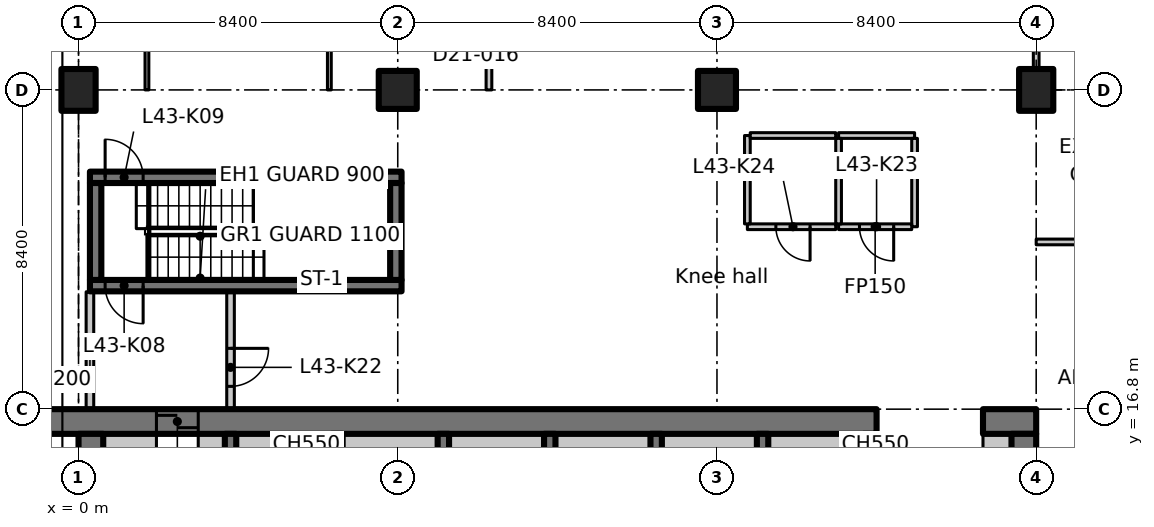
"""IFC4 building model, lengths in metres.
Left out: names, types, materials, properties, quantities, classifications, styles, units other than length and angle.
Written with IfcOpenShell. Run it as: python <this file> out.ifc"""

import sys

from ifc_helpers import new_model, si_unit, direction, frame, frame_2d, origin, origin_2d, place, context, subcontext, project, spatial, polyline, rectangle, outline, extrude, element, fill, save


model = new_model("IFC4")
c1 = context("Model", 3, precision=1e-05, world=origin(), true_north=direction((0.0, 1.0)))
c2 = subcontext(c1, "Body", "Model", "MODEL_VIEW")
j1 = project(units=[si_unit("LENGTHUNIT", "METRE"), si_unit("PLANEANGLEUNIT", "RADIAN")], contexts=[c1])
p1 = place(None, origin())
s1 = spatial("IfcSite", under=j1, at=p1, CompositionType="ELEMENT")
p2 = place(p1, origin())
s2 = spatial("IfcBuilding", under=s1, at=p2, CompositionType="ELEMENT")
p3 = place(p2, frame((0.0, 0.0, 174.0)))
s3 = spatial("IfcBuildingStorey", under=s2, at=p3, CompositionType="ELEMENT", Elevation=174.0)
p4 = place(p3, frame((0.0, 25.2, 0.0), z_axis=(0.0, 0.0, 1.0), x_axis=(1.0, 0.0, 0.0)))
e1 = element("IfcColumn", 1, at=p4, inside=s3, PredefinedType="COLUMN", context=c2, shape_type="SweptSolid", body=[
    extrude(rectangle(XDim=0.9, YDim=1.1, at=origin_2d()), origin(), (0.0, 0.0, 1.0), 3.35),
])
for number, where, z_axis, x_axis in (
    (2, (8.4, 25.2, 0.0), (0.0, 0.0, 1.0), (1.0, 0.0, 0.0)),
    (3, (16.8, 25.2, 0.0), (0.0, 0.0, 1.0), (1.0, 0.0, 0.0)),
):
    element("IfcColumn", number, at=place(p3, frame(where, z_axis=z_axis, x_axis=x_axis)), inside=s3, PredefinedType="COLUMN", context=c2, shape_type="SweptSolid", body=[
        extrude(rectangle(XDim=1.0, YDim=1.0, at=origin_2d()), origin(), (0.0, 0.0, 1.0), 3.35),
    ])
p5 = place(p3, frame((25.2, 25.2, 0.0), z_axis=(0.0, 0.0, 1.0), x_axis=(1.0, 0.0, 0.0)))
e4 = element("IfcColumn", 4, at=p5, inside=s3, PredefinedType="COLUMN", context=c2, shape_type="SweptSolid", body=[
    extrude(rectangle(XDim=0.9, YDim=1.1, at=origin_2d()), origin(), (0.0, 0.0, 1.0), 3.35),
])
p6 = place(p3, frame((-1.1, 16.475, 0.0), z_axis=(0.0, 0.0, 1.0), x_axis=(1.0, 0.0, 0.0)))
e5 = element("IfcWall", 5, at=p6, inside=s3, PredefinedType="SHEAR", context=c2, shape_type="SweptSolid", body=[
    extrude(rectangle(XDim=22.1, YDim=0.65, at=frame_2d((11.05, 0.0))), origin(), (0.0, 0.0, 1.0), 3.35),
])
p7 = place(p6, frame((3.15, 0.0, 0.0)))
e6 = element("IfcOpeningElement", 6, at=p7, cuts=e5, PredefinedType="OPENING", context=c2, shape_type="SweptSolid", body=[
    extrude(rectangle(XDim=1.1, YDim=2.3, at=frame_2d((0.55, 1.15))), frame((0.0, 0.335, 0.0), z_axis=(0.0, -1.0, 0.0), x_axis=(1.0, 0.0, 0.0)), (0.0, 0.0, 1.0), 0.67),
])
p8 = place(p3, frame((23.8, 16.475, 0.0), z_axis=(0.0, 0.0, 1.0), x_axis=(1.0, 0.0, 0.0)))
e7 = element("IfcWall", 7, at=p8, inside=s3, PredefinedType="SHEAR", context=c2, shape_type="SweptSolid", body=[
    extrude(rectangle(XDim=1.4, YDim=0.65, at=frame_2d((0.7, 0.0))), origin(), (0.0, 0.0, 1.0), 3.35),
])
p9 = place(p3, frame((0.325, 7.286, 0.0), z_axis=(0.0, 0.0, 1.0), x_axis=(0.0, 1.0, 0.0)))
e8 = element("IfcWall", 8, at=p9, inside=s3, PredefinedType="SHEAR", context=c2, shape_type="SweptSolid", body=[
    extrude(rectangle(XDim=8.864, YDim=0.65, at=frame_2d((4.432, 0.0))), origin(), (0.0, 0.0, 1.0), 3.35),
])
p10 = place(p3, frame((24.875, 12.6, 0.0), z_axis=(0.0, 0.0, 1.0), x_axis=(0.0, 1.0, 0.0)))
e9 = element("IfcWall", 9, at=p10, inside=s3, PredefinedType="SHEAR", context=c2, shape_type="SweptSolid", body=[
    extrude(rectangle(XDim=3.55, YDim=0.65, at=frame_2d((1.775, 0.0))), origin(), (0.0, 0.0, 1.0), 3.35),
])
p11 = place(p3, frame((0.65, 15.875, 0.0), z_axis=(0.0, 0.0, 1.0), x_axis=(1.0, 0.0, 0.0)))
e10 = element("IfcWall", 10, at=p11, inside=s3, PredefinedType="PARTITIONING", context=c2, shape_type="SweptSolid", body=[
    extrude(rectangle(XDim=1.4, YDim=0.55, at=frame_2d((0.7, 0.0))), origin(), (0.0, 0.0, 1.0), 3.35),
])
p12 = place(p3, frame((23.8, 15.875, 0.0), z_axis=(0.0, 0.0, 1.0), x_axis=(1.0, 0.0, 0.0)))
e11 = element("IfcWall", 11, at=p12, inside=s3, PredefinedType="PARTITIONING", context=c2, shape_type="SweptSolid", body=[
    extrude(rectangle(XDim=0.75, YDim=0.55, at=frame_2d((0.375, 0.0))), origin(), (0.0, 0.0, 1.0), 3.35),
])
for number, where, z_axis, x_axis in (
    (12, (4.0, 12.95, 0.0), (0.0, 0.0, 1.0), (0.0, 1.0, 0.0)),
    (13, (6.8, 12.95, 0.0), (0.0, 0.0, 1.0), (0.0, 1.0, 0.0)),
    (14, (9.6, 12.95, 0.0), (0.0, 0.0, 1.0), (0.0, 1.0, 0.0)),
    (15, (12.4, 12.95, 0.0), (0.0, 0.0, 1.0), (0.0, 1.0, 0.0)),
    (16, (15.2, 12.95, 0.0), (0.0, 0.0, 1.0), (0.0, 1.0, 0.0)),
    (17, (18.0, 12.95, 0.0), (0.0, 0.0, 1.0), (0.0, 1.0, 0.0)),
    (18, (20.8, 12.95, 0.0), (0.0, 0.0, 1.0), (0.0, 1.0, 0.0)),
):
    element("IfcWall", number, at=place(p3, frame(where, z_axis=z_axis, x_axis=x_axis)), inside=s3, PredefinedType="SHEAR", context=c2, shape_type="SweptSolid", body=[
        extrude(rectangle(XDim=3.2, YDim=0.3, at=frame_2d((1.6, 0.0))), origin(), (0.0, 0.0, 1.0), 3.35),
    ])
p13 = place(p3, frame((8.5, 20.05, 0.0), z_axis=(0.0, 0.0, 1.0), x_axis=(-1.0, 0.0, 0.0)))
e19 = element("IfcWall", 19, at=p13, inside=s3, PredefinedType="SHEAR", context=c2, shape_type="SweptSolid", body=[
    extrude(rectangle(XDim=8.2, YDim=0.3, at=frame_2d((4.1, 0.0))), origin(), (0.0, 0.0, 1.0), 3.35),
])
p14 = place(p13, frame((6.8, 0.0, 0.0)))
e20 = element("IfcOpeningElement", 20, at=p14, cuts=e19, PredefinedType="OPENING", context=c2, shape_type="SweptSolid", body=[
    extrude(rectangle(XDim=1.0, YDim=2.1, at=frame_2d((0.5, 1.05))), frame((0.0, 0.16, 0.0), z_axis=(0.0, -1.0, 0.0), x_axis=(1.0, 0.0, 0.0)), (0.0, 0.0, 1.0), 0.32),
])
p15 = place(p3, frame((0.3, 22.9, 0.0), z_axis=(0.0, 0.0, 1.0), x_axis=(1.0, 0.0, 0.0)))
e21 = element("IfcWall", 21, at=p15, inside=s3, PredefinedType="SHEAR", context=c2, shape_type="SweptSolid", body=[
    extrude(rectangle(XDim=8.2, YDim=0.3, at=frame_2d((4.1, 0.0))), origin(), (0.0, 0.0, 1.0), 3.35),
])
p16 = place(p15, frame((0.4, 0.0, 0.0)))
e22 = element("IfcOpeningElement", 22, at=p16, cuts=e21, PredefinedType="OPENING", context=c2, shape_type="SweptSolid", body=[
    extrude(rectangle(XDim=1.0, YDim=2.1, at=frame_2d((0.5, 1.05))), frame((0.0, 0.16, 0.0), z_axis=(0.0, -1.0, 0.0), x_axis=(1.0, 0.0, 0.0)), (0.0, 0.0, 1.0), 0.32),
])
for number, where, z_axis, x_axis in (
    (23, (0.45, 20.2, 0.0), (0.0, 0.0, 1.0), (0.0, 1.0, 0.0)),
    (24, (8.35, 20.2, 0.0), (0.0, 0.0, 1.0), (0.0, 1.0, 0.0)),
):
    element("IfcWall", number, at=place(p3, frame(where, z_axis=z_axis, x_axis=x_axis)), inside=s3, PredefinedType="SHEAR", context=c2, shape_type="SweptSolid", body=[
        extrude(rectangle(XDim=2.55, YDim=0.3, at=frame_2d((1.275, 0.0))), origin(), (0.0, 0.0, 1.0), 3.35),
    ])
p17 = place(p3, frame((0.3, 16.812, 0.0), z_axis=(0.0, 0.0, 1.0), x_axis=(0.0, 1.0, 0.0)))
e25 = element("IfcWall", 25, at=p17, inside=s3, PredefinedType="PARTITIONING", context=c2, shape_type="SweptSolid", body=[
    extrude(rectangle(XDim=3.076, YDim=0.2, at=frame_2d((1.538, 0.0))), origin(), (0.0, 0.0, 1.0), 2.98),
])
p18 = place(p3, frame((4.0, 19.888, 0.0), z_axis=(0.0, 0.0, 1.0), x_axis=(0.0, -1.0, 0.0)))
e26 = element("IfcWall", 26, at=p18, inside=s3, PredefinedType="PARTITIONING", context=c2, shape_type="SweptSolid", body=[
    extrude(rectangle(XDim=3.076, YDim=0.2, at=frame_2d((1.538, 0.0))), origin(), (0.0, 0.0, 1.0), 3.35),
])
p19 = place(p18, frame((1.488, 0.0, 0.0)))
e27 = element("IfcOpeningElement", 27, at=p19, cuts=e26, PredefinedType="OPENING", context=c2, shape_type="SweptSolid", body=[
    extrude(rectangle(XDim=1.0, YDim=2.1, at=frame_2d((0.5, 1.05))), frame((0.0, 0.11, 0.0), z_axis=(0.0, -1.0, 0.0), x_axis=(1.0, 0.0, 0.0)), (0.0, 0.0, 1.0), 0.22),
])
p20 = place(p3, frame((20.0, 24.0, 0.0), z_axis=(0.0, 0.0, 1.0), x_axis=(1.0, 0.0, 0.0)))
e28 = element("IfcWall", 28, at=p20, inside=s3, PredefinedType="PARTITIONING", context=c2, shape_type="SweptSolid", body=[
    extrude(rectangle(XDim=2.0, YDim=0.15, at=frame_2d((1.0, 0.0))), origin(), (0.0, 0.0, 1.0), 3.35),
])
p21 = place(p3, frame((22.0, 23.925, 0.0), z_axis=(0.0, 0.0, 1.0), x_axis=(0.0, -1.0, 0.0)))
e29 = element("IfcWall", 29, at=p21, inside=s3, PredefinedType="PARTITIONING", context=c2, shape_type="SweptSolid", body=[
    extrude(rectangle(XDim=2.325, YDim=0.15, at=frame_2d((1.163, 0.0))), origin(), (0.0, 0.0, 1.0), 3.35),
])
p22 = place(p3, frame((21.925, 21.6, 0.0), z_axis=(0.0, 0.0, 1.0), x_axis=(-1.0, 0.0, 0.0)))
e30 = element("IfcWall", 30, at=p22, inside=s3, PredefinedType="PARTITIONING", context=c2, shape_type="SweptSolid", body=[
    extrude(rectangle(XDim=1.925, YDim=0.15, at=frame_2d((0.962, 0.0))), origin(), (0.0, 0.0, 1.0), 3.35),
])
p23 = place(p22, frame((0.475, 0.0, 0.0)))
e31 = element("IfcOpeningElement", 31, at=p23, cuts=e30, PredefinedType="OPENING", context=c2, shape_type="SweptSolid", body=[
    extrude(rectangle(XDim=0.9, YDim=2.1, at=frame_2d((0.45, 1.05))), frame((0.0, 0.085, 0.0), z_axis=(0.0, -1.0, 0.0), x_axis=(1.0, 0.0, 0.0)), (0.0, 0.0, 1.0), 0.17),
])
p24 = place(p3, frame((20.0, 21.675, 0.0), z_axis=(0.0, 0.0, 1.0), x_axis=(0.0, 1.0, 0.0)))
e32 = element("IfcWall", 32, at=p24, inside=s3, PredefinedType="PARTITIONING", context=c2, shape_type="SweptSolid", body=[
    extrude(rectangle(XDim=2.25, YDim=0.15, at=frame_2d((1.125, 0.0))), origin(), (0.0, 0.0, 1.0), 3.35),
])
p25 = place(p3, frame((19.925, 21.6, 0.0), z_axis=(0.0, 0.0, 1.0), x_axis=(-1.0, 0.0, 0.0)))
e33 = element("IfcWall", 33, at=p25, inside=s3, PredefinedType="PARTITIONING", context=c2, shape_type="SweptSolid", body=[
    extrude(rectangle(XDim=2.325, YDim=0.15, at=frame_2d((1.163, 0.0))), origin(), (0.0, 0.0, 1.0), 3.35),
])
p26 = place(p25, frame((0.675, 0.0, 0.0)))
e34 = element("IfcOpeningElement", 34, at=p26, cuts=e33, PredefinedType="OPENING", context=c2, shape_type="SweptSolid", body=[
    extrude(rectangle(XDim=0.9, YDim=2.1, at=frame_2d((0.45, 1.05))), frame((0.0, 0.085, 0.0), z_axis=(0.0, -1.0, 0.0), x_axis=(1.0, 0.0, 0.0)), (0.0, 0.0, 1.0), 0.17),
])
p27 = place(p3, frame((17.6, 21.675, 0.0), z_axis=(0.0, 0.0, 1.0), x_axis=(0.0, 1.0, 0.0)))
e35 = element("IfcWall", 35, at=p27, inside=s3, PredefinedType="PARTITIONING", context=c2, shape_type="SweptSolid", body=[
    extrude(rectangle(XDim=2.325, YDim=0.15, at=frame_2d((1.163, 0.0))), origin(), (0.0, 0.0, 1.0), 3.35),
])
p28 = place(p3, frame((17.675, 24.0, 0.0), z_axis=(0.0, 0.0, 1.0), x_axis=(1.0, 0.0, 0.0)))
e36 = element("IfcWall", 36, at=p28, inside=s3, PredefinedType="PARTITIONING", context=c2, shape_type="SweptSolid", body=[
    extrude(rectangle(XDim=2.25, YDim=0.15, at=frame_2d((1.125, 0.0))), origin(), (0.0, 0.0, 1.0), 3.35),
])
p29 = place(p3, frame((3.15, 15.875, 0.0), z_axis=(0.0, 0.0, 1.0), x_axis=(1.0, 0.0, 0.0)))
e37 = element("IfcWall", 37, at=p29, inside=s3, PredefinedType="PARTITIONING", context=c2, shape_type="SweptSolid", body=[
    extrude(rectangle(XDim=0.7, YDim=0.55, at=frame_2d((0.35, 0.0))), origin(), (0.0, 0.0, 1.0), 3.35),
])
for number, where, z_axis, x_axis in (
    (38, (4.15, 15.875, 0.0), (0.0, 0.0, 1.0), (1.0, 0.0, 0.0)),
    (39, (6.95, 15.875, 0.0), (0.0, 0.0, 1.0), (1.0, 0.0, 0.0)),
    (40, (9.75, 15.875, 0.0), (0.0, 0.0, 1.0), (1.0, 0.0, 0.0)),
    (41, (12.55, 15.875, 0.0), (0.0, 0.0, 1.0), (1.0, 0.0, 0.0)),
    (42, (15.35, 15.875, 0.0), (0.0, 0.0, 1.0), (1.0, 0.0, 0.0)),
    (43, (18.15, 15.875, 0.0), (0.0, 0.0, 1.0), (1.0, 0.0, 0.0)),
):
    element("IfcWall", number, at=place(p3, frame(where, z_axis=z_axis, x_axis=x_axis)), inside=s3, PredefinedType="PARTITIONING", context=c2, shape_type="SweptSolid", body=[
        extrude(rectangle(XDim=2.5, YDim=0.55, at=frame_2d((1.25, 0.0))), origin(), (0.0, 0.0, 1.0), 3.35),
    ])
p30 = place(p3, frame((20.95, 15.875, 0.0), z_axis=(0.0, 0.0, 1.0), x_axis=(1.0, 0.0, 0.0)))
e44 = element("IfcWall", 44, at=p30, inside=s3, PredefinedType="PARTITIONING", context=c2, shape_type="SweptSolid", body=[
    extrude(rectangle(XDim=0.05, YDim=0.55, at=frame_2d((0.025, 0.0))), origin(), (0.0, 0.0, 1.0), 3.35),
])
p31 = place(p3, frame((25.2, 21.2, 0.0), z_axis=(0.0, 0.0, 1.0), x_axis=(1.0, 0.0, 0.0)))
e45 = element("IfcWall", 45, at=p31, inside=s3, PredefinedType="PARTITIONING", context=c2, shape_type="SweptSolid", body=[
    extrude(rectangle(XDim=4.2, YDim=0.15, at=frame_2d((2.1, 0.0))), origin(), (0.0, 0.0, 1.0), 3.33),
])
p32 = place(p3, frame((25.2, 31.0, 0.0), z_axis=(0.0, 0.0, 1.0), x_axis=(0.0, -1.0, 0.0)))
e46 = element("IfcWall", 46, at=p32, inside=s3, PredefinedType="PARTITIONING", context=c2, shape_type="SweptSolid", body=[
    extrude(outline(polyline([(0.0, 0.0), (5.23, 0.0), (5.23, 2.98), (0.0, 2.98), (0.0, 0.0)])), frame((0.0, 0.075, 0.0), z_axis=(0.0, -1.0, 0.0), x_axis=(1.0, 0.0, 0.0)), (0.0, 0.0, 1.0), 0.15),
])
p33 = place(p32, frame((2.03, 0.0, 0.0)))
e47 = element("IfcOpeningElement", 47, at=p33, cuts=e46, PredefinedType="OPENING", context=c2, shape_type="SweptSolid", body=[
    extrude(rectangle(XDim=1.1, YDim=2.1, at=frame_2d((0.55, 1.05))), frame((0.0, 0.085, 0.0), z_axis=(0.0, -1.0, 0.0), x_axis=(1.0, 0.0, 0.0)), (0.0, 0.0, 1.0), 0.17),
])
p34 = place(p3, frame((10.8, 25.2, 0.0), z_axis=(0.0, 0.0, 1.0), x_axis=(0.0, 1.0, 0.0)))
e48 = element("IfcWall", 48, at=p34, inside=s3, PredefinedType="PARTITIONING", context=c2, shape_type="SweptSolid", body=[
    extrude(rectangle(XDim=4.2, YDim=0.15, at=frame_2d((2.1, 0.0))), origin(), (0.0, 0.0, 1.0), 3.33),
])
for number, where, z_axis, x_axis in (
    (49, (1.8, 29.4, 0.0), (0.0, 0.0, 1.0), (0.0, -1.0, 0.0)),
    (50, (6.6, 29.4, 0.0), (0.0, 0.0, 1.0), (0.0, -1.0, 0.0)),
):
    element("IfcWall", number, at=place(p3, frame(where, z_axis=z_axis, x_axis=x_axis)), inside=s3, PredefinedType="PARTITIONING", context=c2, shape_type="SweptSolid", body=[
        extrude(rectangle(XDim=4.2, YDim=0.1, at=frame_2d((2.1, 0.0))), origin(), (0.0, 0.0, 1.0), 3.33),
    ])
p35 = place(p7, origin())
e51 = element("IfcDoor", 51, at=p35, inside=s3, OperationType="SLIDING_TO_LEFT", PredefinedType="DOOR", context=c2, shape_type="SweptSolid", body=[
    extrude(rectangle(XDim=1.1, YDim=2.3, at=frame_2d((0.55, 1.15))), frame((0.0, 0.025, 0.0), z_axis=(0.0, -1.0, 0.0), x_axis=(1.0, 0.0, 0.0)), (0.0, 0.0, 1.0), 0.05),
])
fill(e6, e51)
p36 = place(p14, origin())
e52 = element("IfcDoor", 52, at=p36, inside=s3, OperationType="SINGLE_SWING_RIGHT", PredefinedType="DOOR", context=c2, shape_type="SweptSolid", body=[
    extrude(rectangle(XDim=1.0, YDim=2.1, at=frame_2d((0.5, 1.05))), frame((0.0, 0.025, 0.0), z_axis=(0.0, -1.0, 0.0), x_axis=(1.0, 0.0, 0.0)), (0.0, 0.0, 1.0), 0.05),
])
fill(e20, e52)
p37 = place(p16, origin())
e53 = element("IfcDoor", 53, at=p37, inside=s3, OperationType="SINGLE_SWING_LEFT", PredefinedType="DOOR", context=c2, shape_type="SweptSolid", body=[
    extrude(rectangle(XDim=1.0, YDim=2.1, at=frame_2d((0.5, 1.05))), frame((0.0, 0.025, 0.0), z_axis=(0.0, -1.0, 0.0), x_axis=(1.0, 0.0, 0.0)), (0.0, 0.0, 1.0), 0.05),
])
fill(e22, e53)
p38 = place(p19, origin())
e54 = element("IfcDoor", 54, at=p38, inside=s3, OperationType="SINGLE_SWING_RIGHT", PredefinedType="DOOR", context=c2, shape_type="SweptSolid", body=[
    extrude(rectangle(XDim=1.0, YDim=2.1, at=frame_2d((0.5, 1.05))), frame((0.0, 0.025, 0.0), z_axis=(0.0, -1.0, 0.0), x_axis=(1.0, 0.0, 0.0)), (0.0, 0.0, 1.0), 0.05),
])
fill(e27, e54)
p39 = place(p23, origin())
e55 = element("IfcDoor", 55, at=p39, inside=s3, OperationType="SINGLE_SWING_LEFT", PredefinedType="DOOR", context=c2, shape_type="SweptSolid", body=[
    extrude(rectangle(XDim=0.9, YDim=2.1, at=frame_2d((0.45, 1.05))), frame((0.0, 0.025, 0.0), z_axis=(0.0, -1.0, 0.0), x_axis=(1.0, 0.0, 0.0)), (0.0, 0.0, 1.0), 0.05),
])
fill(e31, e55)
p40 = place(p26, origin())
e56 = element("IfcDoor", 56, at=p40, inside=s3, OperationType="SINGLE_SWING_RIGHT", PredefinedType="DOOR", context=c2, shape_type="SweptSolid", body=[
    extrude(rectangle(XDim=0.9, YDim=2.1, at=frame_2d((0.45, 1.05))), frame((0.0, 0.025, 0.0), z_axis=(0.0, -1.0, 0.0), x_axis=(1.0, 0.0, 0.0)), (0.0, 0.0, 1.0), 0.05),
])
fill(e34, e56)
save(model, sys.argv[1])
